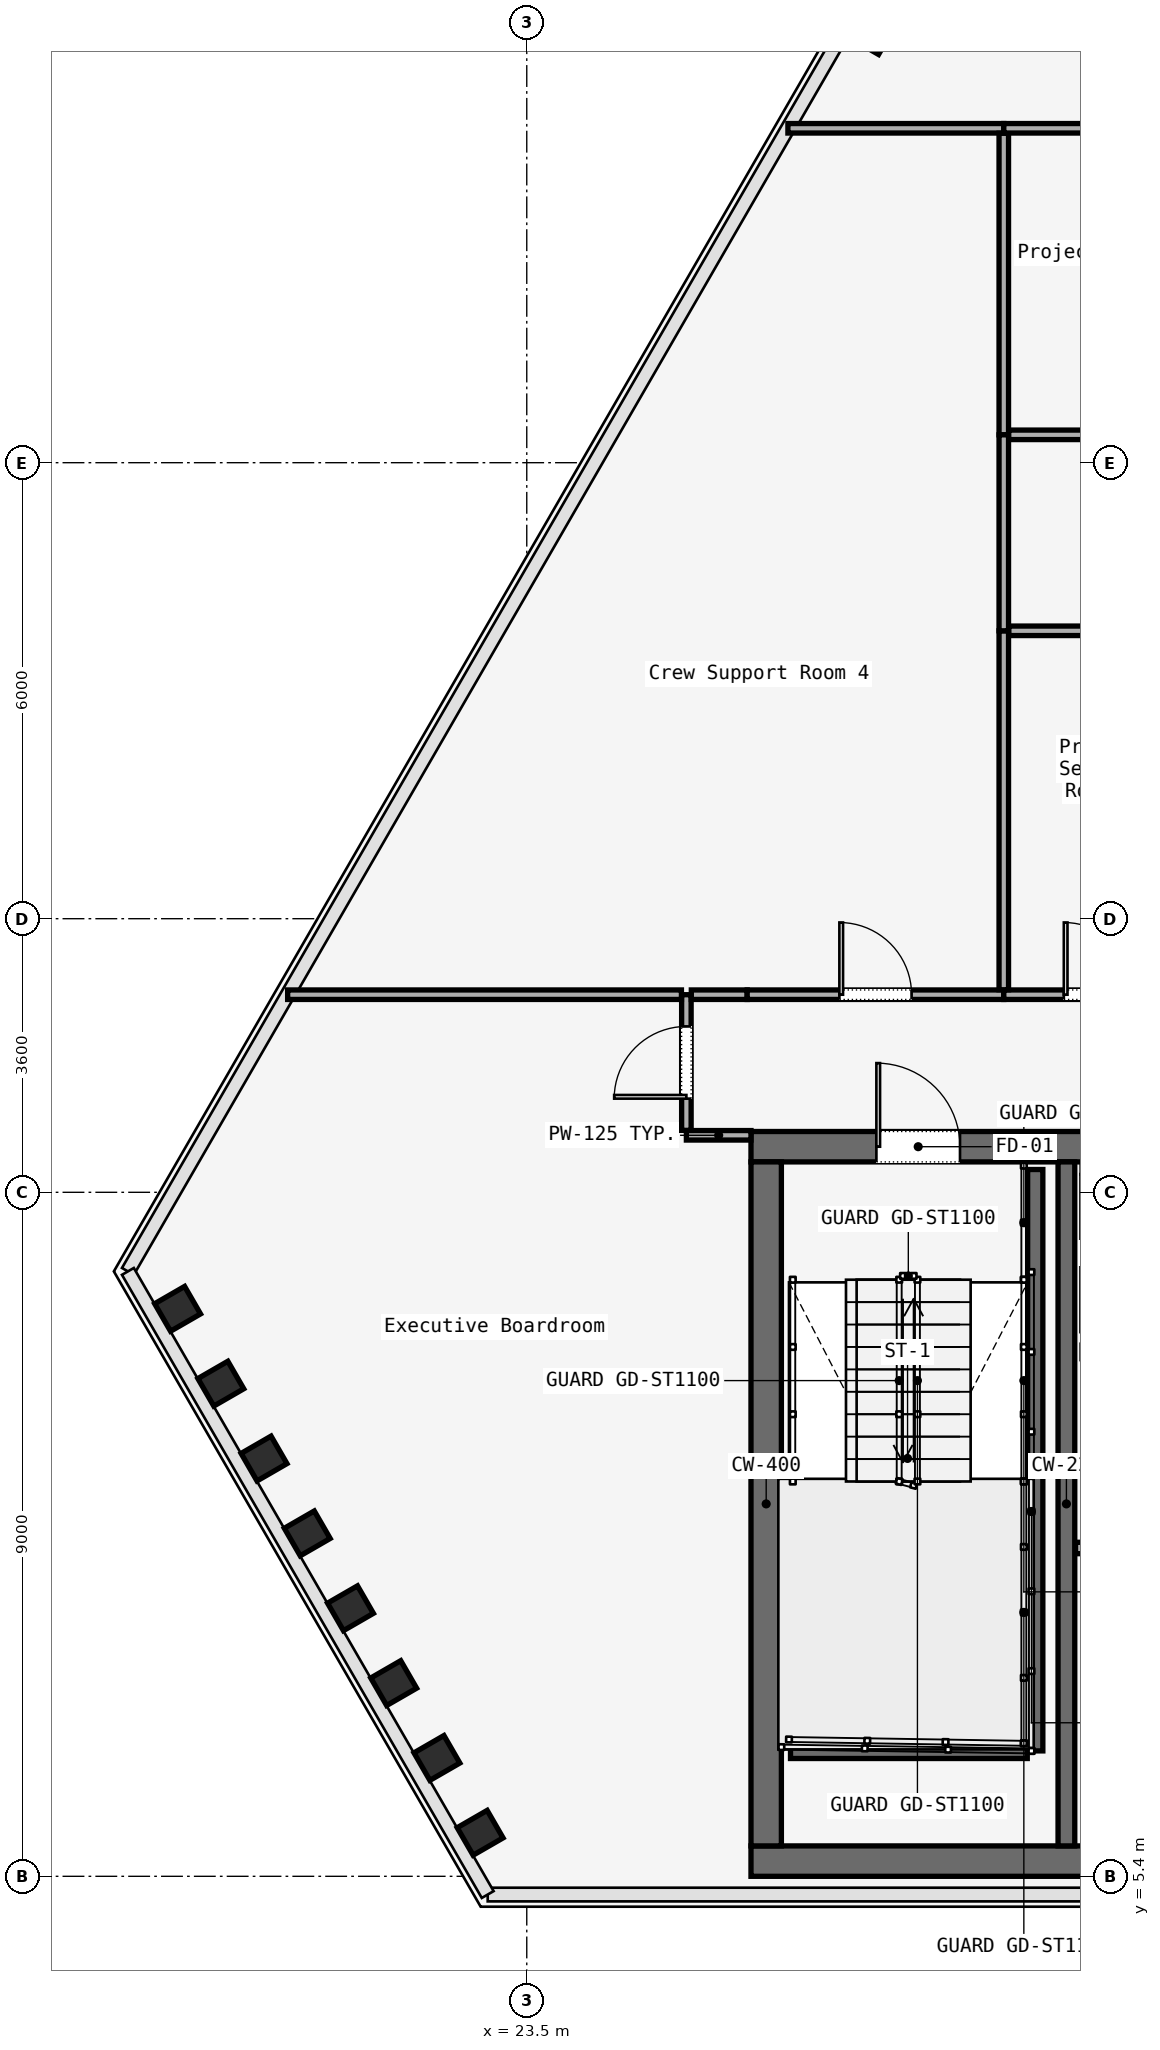
"""IFC4 building model, lengths in metres.
Left out: names, types, materials, properties, quantities, classifications, styles, units other than length and angle.
Written with IfcOpenShell. Run it as: python <this file> out.ifc"""

import sys

from ifc_helpers import new_model, si_unit, direction, frame, frame_2d, origin, origin_2d, place, context, subcontext, project, spatial, rectangle, i_section, extrude, element, fill, save


model = new_model("IFC4")
c1 = context("Model", 3, precision=1e-05, world=origin(), true_north=direction((0.0, 1.0)))
c2 = subcontext(c1, "Body", "Model", "MODEL_VIEW")
j1 = project(units=[si_unit("LENGTHUNIT", "METRE"), si_unit("PLANEANGLEUNIT", "RADIAN")], contexts=[c1])
p1 = place(None, origin())
s1 = spatial("IfcSite", under=j1, at=p1, CompositionType="ELEMENT")
p2 = place(p1, origin())
s2 = spatial("IfcBuilding", under=s1, at=p2, CompositionType="ELEMENT")
p3 = place(p2, frame((0.0, 0.0, 184.0)))
s3 = spatial("IfcBuildingStorey", under=s2, at=p3, CompositionType="ELEMENT", Elevation=184.0)
p4 = place(p3, frame((26.45, 15.0, 0.0), z_axis=(0.0, 0.0, 1.0), x_axis=(1.0, 0.0, 0.0)))
e1 = element("IfcWall", 1, at=p4, inside=s3, PredefinedType="SOLIDWALL", context=c2, shape_type="SweptSolid", body=[
    extrude(rectangle(XDim=31.1, YDim=0.4, at=frame_2d((15.55, 0.0))), origin(), (0.0, 0.0, 1.0), 3.58),
])
p5 = place(p4, frame((1.65, 0.0, 0.0)))
e2 = element("IfcOpeningElement", 2, at=p5, cuts=e1, PredefinedType="OPENING", context=c2, shape_type="SweptSolid", body=[
    extrude(rectangle(XDim=1.1, YDim=2.2, at=frame_2d((0.55, 1.1))), frame((0.0, 0.2, 0.0), z_axis=(0.0, -1.0, 0.0), x_axis=(1.0, 0.0, 0.0)), (0.0, 0.0, 1.0), 0.4),
])
p6 = place(p4, frame((13.65, 0.0, 0.0)))
e3 = element("IfcOpeningElement", 3, at=p6, cuts=e1, PredefinedType="OPENING", context=c2, shape_type="SweptSolid", body=[
    extrude(rectangle(XDim=1.1, YDim=2.2, at=frame_2d((0.55, 1.1))), frame((0.0, 0.2, 0.0), z_axis=(0.0, -1.0, 0.0), x_axis=(1.0, 0.0, 0.0)), (0.0, 0.0, 1.0), 0.4),
])
p7 = place(p4, frame((25.55, 0.0, 0.0)))
e4 = element("IfcOpeningElement", 4, at=p7, cuts=e1, PredefinedType="OPENING", context=c2, shape_type="SweptSolid", body=[
    extrude(rectangle(XDim=1.1, YDim=2.2, at=frame_2d((0.55, 1.1))), frame((0.0, 0.2, 0.0), z_axis=(0.0, -1.0, 0.0), x_axis=(1.0, 0.0, 0.0)), (0.0, 0.0, 1.0), 0.4),
])
p8 = place(p4, frame((10.7, 0.0, 0.0)))
e5 = element("IfcOpeningElement", 5, at=p8, cuts=e1, PredefinedType="OPENING", context=c2, shape_type="SweptSolid", body=[
    extrude(rectangle(XDim=1.4, YDim=2.2, at=frame_2d((0.7, 1.1))), frame((0.0, 0.2, 0.0), z_axis=(0.0, -1.0, 0.0), x_axis=(1.0, 0.0, 0.0)), (0.0, 0.0, 1.0), 0.4),
])
p9 = place(p4, frame((19.35, 0.0, 0.0)))
e6 = element("IfcOpeningElement", 6, at=p9, cuts=e1, PredefinedType="OPENING", context=c2, shape_type="SweptSolid", body=[
    extrude(rectangle(XDim=1.1, YDim=2.2, at=frame_2d((0.55, 1.1))), frame((0.0, 0.2, 0.0), z_axis=(0.0, -1.0, 0.0), x_axis=(1.0, 0.0, 0.0)), (0.0, 0.0, 1.0), 0.4),
])
p10 = place(p4, frame((21.4, 0.0, 0.0)))
e7 = element("IfcOpeningElement", 7, at=p10, cuts=e1, PredefinedType="OPENING", context=c2, shape_type="SweptSolid", body=[
    extrude(rectangle(XDim=0.9, YDim=2.1, at=frame_2d((0.45, 1.05))), frame((0.0, 0.2, 0.0), z_axis=(0.0, -1.0, 0.0), x_axis=(1.0, 0.0, 0.0)), (0.0, 0.0, 1.0), 0.4),
])
p11 = place(p4, frame((23.35, 0.0, 0.0)))
e8 = element("IfcOpeningElement", 8, at=p11, cuts=e1, PredefinedType="OPENING", context=c2, shape_type="SweptSolid", body=[
    extrude(rectangle(XDim=1.3, YDim=2.3, at=frame_2d((0.65, 1.15))), frame((0.0, 0.2, 0.0), z_axis=(0.0, -1.0, 0.0), x_axis=(1.0, 0.0, 0.0)), (0.0, 0.0, 1.0), 0.4),
])
p12 = place(p3, frame((26.45, 5.6, 0.0), z_axis=(0.0, 0.0, 1.0), x_axis=(1.0, 0.0, 0.0)))
e9 = element("IfcWall", 9, at=p12, inside=s3, PredefinedType="SOLIDWALL", context=c2, shape_type="SweptSolid", body=[
    extrude(rectangle(XDim=31.1, YDim=0.4, at=frame_2d((15.55, 0.0))), origin(), (0.0, 0.0, 1.0), 3.58),
])
p13 = place(p3, frame((26.65, 5.8, 0.0), z_axis=(0.0, 0.0, 1.0), x_axis=(0.0, 1.0, 0.0)))
e10 = element("IfcWall", 10, at=p13, inside=s3, PredefinedType="SOLIDWALL", context=c2, shape_type="SweptSolid", body=[
    extrude(rectangle(XDim=9.0, YDim=0.4, at=frame_2d((4.5, 0.0))), origin(), (0.0, 0.0, 1.0), 3.58),
])
p14 = place(p3, frame((30.6, 5.8, 0.0), z_axis=(0.0, 0.0, 1.0), x_axis=(0.0, 1.0, 0.0)))
e11 = element("IfcWall", 11, at=p14, inside=s3, PredefinedType="SOLIDWALL", context=c2, shape_type="SweptSolid", body=[
    extrude(rectangle(XDim=9.0, YDim=0.22, at=frame_2d((4.5, 0.0))), origin(), (0.0, 0.0, 1.0), 3.58),
])
for number, where, z_axis, x_axis in (
    (12, (28.036, 29.666, 0.0), (0.0, 0.0, 1.0), (0.5, 0.866, 0.0)),
    (13, (18.906, 12.867, 0.0), (0.0, 0.0, 1.0), (-0.5, 0.866, 0.0)),
    (14, (19.475, 11.882, 0.0), (0.0, 0.0, 1.0), (-0.5, 0.866, 0.0)),
    (15, (20.043, 10.897, 0.0), (0.0, 0.0, 1.0), (-0.5, 0.866, 0.0)),
    (16, (20.612, 9.912, 0.0), (0.0, 0.0, 1.0), (-0.5, 0.866, 0.0)),
    (17, (21.181, 8.927, 0.0), (0.0, 0.0, 1.0), (-0.5, 0.866, 0.0)),
    (18, (21.749, 7.942, 0.0), (0.0, 0.0, 1.0), (-0.5, 0.866, 0.0)),
    (19, (22.318, 6.958, 0.0), (0.0, 0.0, 1.0), (-0.5, 0.866, 0.0)),
    (20, (22.886, 5.972, 0.0), (0.0, 0.0, 1.0), (-0.5, 0.866, 0.0)),
):
    element("IfcColumn", number, at=place(p3, frame(where, z_axis=z_axis, x_axis=x_axis)), inside=s3, PredefinedType="COLUMN", context=c2, shape_type="SweptSolid", body=[
        extrude(i_section(OverallWidth=0.418, OverallDepth=0.455, WebThickness=0.042, FlangeThickness=0.052, FilletRadius=0.015, at=origin_2d()), origin(), (0.0, 0.0, 1.0), 3.58),
    ])
p15 = place(p3, frame((30.19, 14.7, 0.0), z_axis=(0.0, 0.0, 1.0), x_axis=(0.0, -1.0, 0.0)))
e21 = element("IfcWall", 21, at=p15, inside=s3, PredefinedType="SOLIDWALL", context=c2, shape_type="SweptSolid", body=[
    extrude(rectangle(XDim=7.65, YDim=0.2, at=frame_2d((3.825, 0.0))), origin(), (0.0, 0.0, 1.0), 3.8),
])
p16 = place(p3, frame((26.97, 7.05, 0.0), z_axis=(0.0, 0.0, 1.0), x_axis=(1.0, 0.0, 0.0)))
e22 = element("IfcWall", 22, at=p16, inside=s3, PredefinedType="SOLIDWALL", context=c2, shape_type="SweptSolid", body=[
    extrude(rectangle(XDim=3.115, YDim=0.2, at=frame_2d((1.558, 0.0))), origin(), (0.0, 0.0, 1.0), 3.8),
])
p17 = place(p3, frame((30.72, 9.72, 0.0), z_axis=(0.0, 0.0, 1.0), x_axis=(1.0, 0.0, 0.0)))
e23 = element("IfcWall", 23, at=p17, inside=s3, PredefinedType="PARTITIONING", context=c2, shape_type="SweptSolid", body=[
    extrude(rectangle(XDim=7.96, YDim=0.15, at=frame_2d((3.98, 0.0))), origin(), (0.0, 0.0, 1.0), 3.01),
])
p18 = place(p17, frame((1.5, 0.0, 0.0)))
e24 = element("IfcOpeningElement", 24, at=p18, cuts=e23, PredefinedType="OPENING", context=c2, shape_type="SweptSolid", body=[
    extrude(rectangle(XDim=0.95, YDim=2.2, at=frame_2d((0.475, 1.1))), frame((0.0, 0.075, 0.0), z_axis=(0.0, -1.0, 0.0), x_axis=(1.0, 0.0, 0.0)), (0.0, 0.0, 1.0), 0.15),
])
p19 = place(p17, frame((4.81, 0.0, 0.0)))
e25 = element("IfcOpeningElement", 25, at=p19, cuts=e23, PredefinedType="OPENING", context=c2, shape_type="SweptSolid", body=[
    extrude(rectangle(XDim=0.95, YDim=2.2, at=frame_2d((0.475, 1.1))), frame((0.0, 0.075, 0.0), z_axis=(0.0, -1.0, 0.0), x_axis=(1.0, 0.0, 0.0)), (0.0, 0.0, 1.0), 0.15),
])
p20 = place(p3, frame((26.45, 15.15, 0.0), z_axis=(0.0, 0.0, 1.0), x_axis=(-1.0, 0.0, 0.0)))
e26 = element("IfcWall", 26, at=p20, inside=s3, PredefinedType="PARTITIONING", context=c2, shape_type="SweptSolid", body=[
    extrude(rectangle(XDim=0.85, YDim=0.125, at=frame_2d((0.425, 0.0))), origin(), (0.0, 0.0, 1.0), 3.01),
])
p21 = place(p3, frame((25.6, 15.215, 0.0), z_axis=(0.0, 0.0, 1.0), x_axis=(0.0, 1.0, 0.0)))
e27 = element("IfcWall", 27, at=p21, inside=s3, PredefinedType="PARTITIONING", context=c2, shape_type="SweptSolid", body=[
    extrude(rectangle(XDim=1.785, YDim=0.125, at=frame_2d((0.893, 0.0))), origin(), (0.0, 0.0, 1.0), 3.01),
])
p22 = place(p21, frame((0.417, 0.0, 0.0)))
e28 = element("IfcOpeningElement", 28, at=p22, cuts=e27, PredefinedType="OPENING", context=c2, shape_type="SweptSolid", body=[
    extrude(rectangle(XDim=0.95, YDim=2.2, at=frame_2d((0.475, 1.1))), frame((0.0, 0.062, 0.0), z_axis=(0.0, -1.0, 0.0), x_axis=(1.0, 0.0, 0.0)), (0.0, 0.0, 1.0), 0.125),
])
p23 = place(p3, frame((25.665, 17.0, 0.0), z_axis=(0.0, 0.0, 1.0), x_axis=(1.0, 0.0, 0.0)))
e29 = element("IfcWall", 29, at=p23, inside=s3, PredefinedType="PARTITIONING", context=c2, shape_type="SweptSolid", body=[
    extrude(rectangle(XDim=0.735, YDim=0.125, at=frame_2d((0.367, 0.0))), origin(), (0.0, 0.0, 1.0), 3.01),
])
p24 = place(p3, frame((26.4, 17.0, 0.0), z_axis=(0.0, 0.0, 1.0), x_axis=(1.0, 0.0, 0.0)))
e30 = element("IfcWall", 30, at=p24, inside=s3, PredefinedType="PARTITIONING", context=c2, shape_type="SweptSolid", body=[
    extrude(rectangle(XDim=3.376, YDim=0.125, at=frame_2d((1.688, 0.0))), origin(), (0.0, 0.0, 1.0), 3.01),
])
p25 = place(p24, frame((1.213, 0.0, 0.0)))
e31 = element("IfcOpeningElement", 31, at=p25, cuts=e30, PredefinedType="OPENING", context=c2, shape_type="SweptSolid", body=[
    extrude(rectangle(XDim=0.95, YDim=2.2, at=frame_2d((0.475, 1.1))), frame((0.0, 0.062, 0.0), z_axis=(0.0, -1.0, 0.0), x_axis=(1.0, 0.0, 0.0)), (0.0, 0.0, 1.0), 0.125),
])
p26 = place(p3, frame((29.776, 17.0, 0.0), z_axis=(0.0, 0.0, 1.0), x_axis=(1.0, 0.0, 0.0)))
e32 = element("IfcWall", 32, at=p26, inside=s3, PredefinedType="PARTITIONING", context=c2, shape_type="SweptSolid", body=[
    extrude(rectangle(XDim=2.53, YDim=0.125, at=frame_2d((1.265, 0.0))), origin(), (0.0, 0.0, 1.0), 3.01),
])
p27 = place(p26, frame((0.79, 0.0, 0.0)))
e33 = element("IfcOpeningElement", 33, at=p27, cuts=e32, PredefinedType="OPENING", context=c2, shape_type="SweptSolid", body=[
    extrude(rectangle(XDim=0.95, YDim=2.2, at=frame_2d((0.475, 1.1))), frame((0.0, 0.062, 0.0), z_axis=(0.0, -1.0, 0.0), x_axis=(1.0, 0.0, 0.0)), (0.0, 0.0, 1.0), 0.125),
])
p28 = place(p3, frame((20.354, 17.0, 0.0), z_axis=(0.0, 0.0, 1.0), x_axis=(1.0, 0.0, 0.0)))
e34 = element("IfcWall", 34, at=p28, inside=s3, PredefinedType="PARTITIONING", context=c2, shape_type="SweptSolid", body=[
    extrude(rectangle(XDim=5.181, YDim=0.125, at=frame_2d((2.59, 0.0))), origin(), (0.0, 0.0, 1.0), 3.01),
])
p29 = place(p3, frame((29.776, 17.065, 0.0), z_axis=(0.0, 0.0, 1.0), x_axis=(0.0, 1.0, 0.0)))
e35 = element("IfcWall", 35, at=p29, inside=s3, PredefinedType="PARTITIONING", context=c2, shape_type="SweptSolid", body=[
    extrude(rectangle(XDim=4.723, YDim=0.125, at=frame_2d((2.362, 0.0))), origin(), (0.0, 0.0, 1.0), 3.01),
])
p30 = place(p3, frame((29.841, 21.788, 0.0), z_axis=(0.0, 0.0, 1.0), x_axis=(1.0, 0.0, 0.0)))
e36 = element("IfcWall", 36, at=p30, inside=s3, PredefinedType="PARTITIONING", context=c2, shape_type="SweptSolid", body=[
    extrude(rectangle(XDim=2.465, YDim=0.125, at=frame_2d((1.232, 0.0))), origin(), (0.0, 0.0, 1.0), 3.01),
])
p31 = place(p3, frame((26.936, 28.4, 0.0), z_axis=(0.0, 0.0, 1.0), x_axis=(1.0, 0.0, 0.0)))
e37 = element("IfcWall", 37, at=p31, inside=s3, PredefinedType="PARTITIONING", context=c2, shape_type="SweptSolid", body=[
    extrude(rectangle(XDim=2.84, YDim=0.125, at=frame_2d((1.42, 0.0))), origin(), (0.0, 0.0, 1.0), 3.01),
])
p32 = place(p3, frame((29.776, 28.335, 0.0), z_axis=(0.0, 0.0, 1.0), x_axis=(0.0, -1.0, 0.0)))
e38 = element("IfcWall", 38, at=p32, inside=s3, PredefinedType="PARTITIONING", context=c2, shape_type="SweptSolid", body=[
    extrude(rectangle(XDim=3.968, YDim=0.125, at=frame_2d((1.984, 0.0))), origin(), (0.0, 0.0, 1.0), 3.01),
])
p33 = place(p3, frame((29.776, 24.367, 0.0), z_axis=(0.0, 0.0, 1.0), x_axis=(0.0, -1.0, 0.0)))
e39 = element("IfcWall", 39, at=p33, inside=s3, PredefinedType="PARTITIONING", context=c2, shape_type="SweptSolid", body=[
    extrude(rectangle(XDim=2.579, YDim=0.125, at=frame_2d((1.289, 0.0))), origin(), (0.0, 0.0, 1.0), 3.01),
])
p34 = place(p3, frame((29.841, 24.367, 0.0), z_axis=(0.0, 0.0, 1.0), x_axis=(1.0, 0.0, 0.0)))
e40 = element("IfcWall", 40, at=p34, inside=s3, PredefinedType="PARTITIONING", context=c2, shape_type="SweptSolid", body=[
    extrude(rectangle(XDim=5.894, YDim=0.125, at=frame_2d((2.947, 0.0))), origin(), (0.0, 0.0, 1.0), 3.01),
])
p35 = place(p34, frame((2.522, 0.0, 0.0)))
e41 = element("IfcOpeningElement", 41, at=p35, cuts=e40, PredefinedType="OPENING", context=c2, shape_type="SweptSolid", body=[
    extrude(rectangle(XDim=0.85, YDim=2.15, at=frame_2d((0.425, 1.075))), frame((0.0, 0.062, 0.0), z_axis=(0.0, -1.0, 0.0), x_axis=(1.0, 0.0, 0.0)), (0.0, 0.0, 1.0), 0.125),
])
p36 = place(p3, frame((29.776, 28.4, 0.0), z_axis=(0.0, 0.0, 1.0), x_axis=(1.0, 0.0, 0.0)))
e42 = element("IfcWall", 42, at=p36, inside=s3, PredefinedType="PARTITIONING", context=c2, shape_type="SweptSolid", body=[
    extrude(rectangle(XDim=4.624, YDim=0.125, at=frame_2d((2.312, 0.0))), origin(), (0.0, 0.0, 1.0), 3.01),
])
p37 = place(p5, origin())
e43 = element("IfcDoor", 43, at=p37, inside=s3, OperationType="SINGLE_SWING_LEFT", PredefinedType="DOOR", context=c2, shape_type="SweptSolid", body=[
    extrude(rectangle(XDim=1.1, YDim=2.2, at=frame_2d((0.55, 1.1))), frame((0.0, 0.025, 0.0), z_axis=(0.0, -1.0, 0.0), x_axis=(1.0, 0.0, 0.0)), (0.0, 0.0, 1.0), 0.05),
])
fill(e2, e43)
p38 = place(p22, origin())
e44 = element("IfcDoor", 44, at=p38, inside=s3, OperationType="SINGLE_SWING_LEFT", PredefinedType="DOOR", context=c2, shape_type="SweptSolid", body=[
    extrude(rectangle(XDim=0.95, YDim=2.2, at=frame_2d((0.475, 1.1))), frame((0.0, 0.025, 0.0), z_axis=(0.0, -1.0, 0.0), x_axis=(1.0, 0.0, 0.0)), (0.0, 0.0, 1.0), 0.05),
])
fill(e28, e44)
p39 = place(p27, origin())
e45 = element("IfcDoor", 45, at=p39, inside=s3, OperationType="SINGLE_SWING_RIGHT", PredefinedType="DOOR", context=c2, shape_type="SweptSolid", body=[
    extrude(rectangle(XDim=0.95, YDim=2.2, at=frame_2d((0.475, 1.1))), frame((0.0, 0.025, 0.0), z_axis=(0.0, -1.0, 0.0), x_axis=(1.0, 0.0, 0.0)), (0.0, 0.0, 1.0), 0.05),
])
fill(e33, e45)
p40 = place(p25, origin())
e46 = element("IfcDoor", 46, at=p40, inside=s3, OperationType="SINGLE_SWING_RIGHT", PredefinedType="DOOR", context=c2, shape_type="SweptSolid", body=[
    extrude(rectangle(XDim=0.95, YDim=2.2, at=frame_2d((0.475, 1.1))), frame((0.0, 0.025, 0.0), z_axis=(0.0, -1.0, 0.0), x_axis=(1.0, 0.0, 0.0)), (0.0, 0.0, 1.0), 0.05),
])
fill(e31, e46)
save(model, sys.argv[1])
